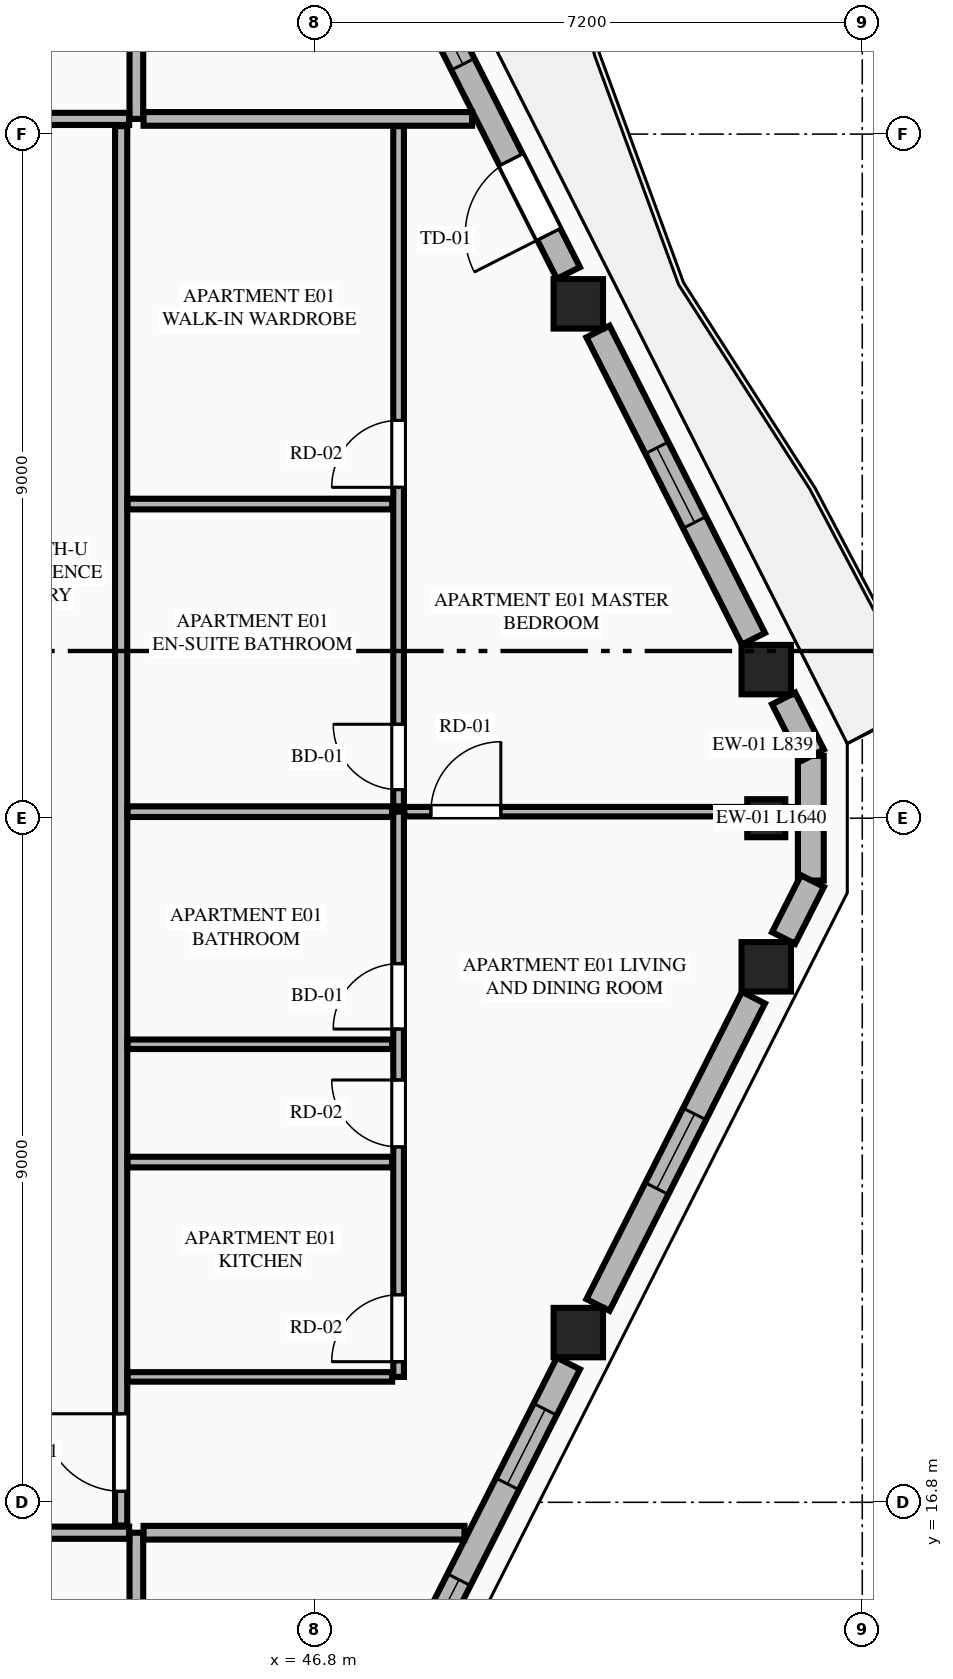
"""IFC4 building model, lengths in metres.
Left out: names, types, materials, properties, quantities, classifications, styles, units other than length and angle.
Written with IfcOpenShell. Run it as: python <this file> out.ifc"""

import sys

from ifc_helpers import new_model, si_unit, direction, frame, frame_2d, origin, origin_2d, place, context, subcontext, project, spatial, rectangle, extrude, element, fill, save


model = new_model("IFC4")
c1 = context("Model", 3, precision=1e-05, world=origin(), true_north=direction((0.0, 1.0)))
c2 = subcontext(c1, "Body", "Model", "MODEL_VIEW")
j1 = project(units=[si_unit("LENGTHUNIT", "METRE"), si_unit("PLANEANGLEUNIT", "RADIAN")], contexts=[c1])
p1 = place(None, origin())
s1 = spatial("IfcSite", under=j1, at=p1, CompositionType="ELEMENT")
p2 = place(p1, origin())
s2 = spatial("IfcBuilding", under=s1, at=p2, CompositionType="ELEMENT")
p3 = place(p2, frame((0.0, 0.0, 291.5)))
s3 = spatial("IfcBuildingStorey", under=s2, at=p3, CompositionType="ELEMENT", Elevation=291.5)
for number, where, z_axis, x_axis in (
    (1, (50.264, 19.033, 0.0), (0.0, 0.0, 1.0), (1.0, 0.0, 0.0)),
    (2, (52.737, 23.845, 0.0), (0.0, 0.0, 1.0), (1.0, 0.0, 0.0)),
    (3, (52.737, 27.755, 0.0), (0.0, 0.0, 1.0), (1.0, 0.0, 0.0)),
    (4, (50.264, 32.567, 0.0), (0.0, 0.0, 1.0), (1.0, 0.0, 0.0)),
):
    element("IfcColumn", number, at=place(p3, frame(where, z_axis=z_axis, x_axis=x_axis)), inside=s3, PredefinedType="COLUMN", context=c2, shape_type="SweptSolid", body=[
        extrude(rectangle(XDim=0.65, YDim=0.65, at=origin_2d()), origin(), (0.0, 0.0, 1.0), 4.0),
    ])
p4 = place(p3, frame((52.737, 25.8, 0.0), z_axis=(0.0, 0.0, 1.0), x_axis=(0.0, 1.0, 0.0)))
e5 = element("IfcColumn", 5, at=p4, inside=s3, PredefinedType="PILASTER", context=c2, shape_type="SweptSolid", body=[
    extrude(rectangle(XDim=0.5, YDim=0.35, at=origin_2d()), origin(), (0.0, 0.0, 1.0), 4.0),
])
p5 = place(p3, frame((53.323, 24.98, 0.0), z_axis=(0.0, 0.0, 1.0), x_axis=(0.0, 1.0, 0.0)))
e6 = element("IfcWall", 6, at=p5, inside=s3, PredefinedType="STANDARD", context=c2, shape_type="SweptSolid", body=[
    extrude(rectangle(XDim=1.64, YDim=0.34, at=frame_2d((0.82, 0.0))), origin(), (0.0, 0.0, 1.0), 3.8),
])
p6 = place(p3, frame((48.002, 14.413, 0.0), z_axis=(0.0, 0.0, 1.0), x_axis=(0.451468341582, 0.892287137949, 0.0)))
e7 = element("IfcWall", 7, at=p6, inside=s3, PredefinedType="STANDARD", context=c2, shape_type="SweptSolid", body=[
    extrude(rectangle(XDim=4.723, YDim=0.34, at=frame_2d((2.361, 0.0))), origin(), (0.0, 0.0, 1.0), 2.99),
])
p7 = place(p6, frame((0.434, 0.0, 0.75)))
e8 = element("IfcOpeningElement", 8, at=p7, cuts=e7, PredefinedType="OPENING", context=c2, shape_type="SweptSolid", body=[
    extrude(rectangle(XDim=1.1, YDim=2.0, at=frame_2d((0.55, 1.0))), frame((0.0, 0.18, 0.0), z_axis=(0.0, -1.0, 0.0), x_axis=(1.0, 0.0, 0.0)), (0.0, 0.0, 1.0), 0.36),
])
p8 = place(p6, frame((2.946, 0.0, 0.75)))
e9 = element("IfcOpeningElement", 9, at=p8, cuts=e7, PredefinedType="OPENING", context=c2, shape_type="SweptSolid", body=[
    extrude(rectangle(XDim=1.1, YDim=2.0, at=frame_2d((0.55, 1.0))), frame((0.0, 0.18, 0.0), z_axis=(0.0, -1.0, 0.0), x_axis=(1.0, 0.0, 0.0)), (0.0, 0.0, 1.0), 0.36),
])
p9 = place(p3, frame((50.523, 19.397, 0.0), z_axis=(0.0, 0.0, 1.0), x_axis=(0.45147697324, 0.892282770558, 0.0)))
e10 = element("IfcWall", 10, at=p9, inside=s3, PredefinedType="STANDARD", context=c2, shape_type="SweptSolid", body=[
    extrude(rectangle(XDim=4.53, YDim=0.34, at=frame_2d((2.265, 0.0))), origin(), (0.0, 0.0, 1.0), 2.99),
])
p10 = place(p9, frame((1.715, 0.0, 0.75)))
e11 = element("IfcOpeningElement", 11, at=p10, cuts=e10, PredefinedType="OPENING", context=c2, shape_type="SweptSolid", body=[
    extrude(rectangle(XDim=1.1, YDim=2.0, at=frame_2d((0.55, 1.0))), frame((0.0, 0.18, 0.0), z_axis=(0.0, -1.0, 0.0), x_axis=(1.0, 0.0, 0.0)), (0.0, 0.0, 1.0), 0.36),
])
p11 = place(p3, frame((52.965, 24.224, 0.0), z_axis=(0.0, 0.0, 1.0), x_axis=(0.4515140893, 0.892263989615, 0.0)))
e12 = element("IfcWall", 12, at=p11, inside=s3, PredefinedType="STANDARD", context=c2, shape_type="SweptSolid", body=[
    extrude(rectangle(XDim=0.839, YDim=0.34, at=frame_2d((0.419, 0.0))), origin(), (0.0, 0.0, 1.0), 3.8),
])
p12 = place(p3, frame((53.344, 26.627, 0.0), z_axis=(0.0, 0.0, 1.0), x_axis=(-0.45139691133, 0.892323275748, 0.0)))
e13 = element("IfcWall", 13, at=p12, inside=s3, PredefinedType="STANDARD", context=c2, shape_type="SweptSolid", body=[
    extrude(rectangle(XDim=0.839, YDim=0.34, at=frame_2d((0.42, 0.0))), origin(), (0.0, 0.0, 1.0), 3.8),
])
p13 = place(p3, frame((52.568, 28.161, 0.0), z_axis=(0.0, 0.0, 1.0), x_axis=(-0.45147697324, 0.892282770558, 0.0)))
e14 = element("IfcWall", 14, at=p13, inside=s3, PredefinedType="STANDARD", context=c2, shape_type="SweptSolid", body=[
    extrude(rectangle(XDim=4.53, YDim=0.34, at=frame_2d((2.265, 0.0))), origin(), (0.0, 0.0, 1.0), 2.99),
])
p14 = place(p13, frame((1.715, 0.0, 0.75)))
e15 = element("IfcOpeningElement", 15, at=p14, cuts=e14, PredefinedType="OPENING", context=c2, shape_type="SweptSolid", body=[
    extrude(rectangle(XDim=1.1, YDim=2.0, at=frame_2d((0.55, 1.0))), frame((0.0, 0.18, 0.0), z_axis=(0.0, -1.0, 0.0), x_axis=(1.0, 0.0, 0.0)), (0.0, 0.0, 1.0), 0.36),
])
p15 = place(p3, frame((50.134, 32.973, 0.0), z_axis=(0.0, 0.0, 1.0), x_axis=(-0.451447516904, 0.892297674255, 0.0)))
e16 = element("IfcWall", 16, at=p15, inside=s3, PredefinedType="STANDARD", context=c2, shape_type="SweptSolid", body=[
    extrude(rectangle(XDim=4.723, YDim=0.34, at=frame_2d((2.361, 0.0))), origin(), (0.0, 0.0, 1.0), 2.99),
])
p16 = place(p15, frame((0.57, 0.0, 0.0)))
e17 = element("IfcOpeningElement", 17, at=p16, cuts=e16, PredefinedType="OPENING", context=c2, shape_type="SweptSolid", body=[
    extrude(rectangle(XDim=1.1, YDim=2.25, at=frame_2d((0.55, 1.125))), frame((0.0, 0.18, 0.0), z_axis=(0.0, -1.0, 0.0), x_axis=(1.0, 0.0, 0.0)), (0.0, 0.0, 1.0), 0.36),
])
p17 = place(p15, frame((3.077, 0.0, 0.75)))
e18 = element("IfcOpeningElement", 18, at=p17, cuts=e16, PredefinedType="OPENING", context=c2, shape_type="SweptSolid", body=[
    extrude(rectangle(XDim=1.1, YDim=2.0, at=frame_2d((0.55, 1.0))), frame((0.0, 0.18, 0.0), z_axis=(0.0, -1.0, 0.0), x_axis=(1.0, 0.0, 0.0)), (0.0, 0.0, 1.0), 0.36),
])
p18 = place(p3, frame((44.45, 8.119, 0.0), z_axis=(0.0, 0.0, 1.0), x_axis=(0.0, 1.0, 0.0)))
e19 = element("IfcWall", 19, at=p18, inside=s3, PredefinedType="PARTITIONING", context=c2, shape_type="SweptSolid", body=[
    extrude(rectangle(XDim=8.281, YDim=0.18, at=frame_2d((4.141, 0.0))), origin(), (0.0, 0.0, 1.0), 3.8),
])
p19 = place(p3, frame((20.445, 16.4, 0.0), z_axis=(0.0, 0.0, 1.0), x_axis=(1.0, 0.0, 0.0)))
e20 = element("IfcWall", 20, at=p19, inside=s3, PredefinedType="PARTITIONING", context=c2, shape_type="SweptSolid", body=[
    extrude(rectangle(XDim=23.91, YDim=0.16, at=frame_2d((11.955, 0.0))), origin(), (0.0, 0.0, 1.0), 3.8),
])
p20 = place(p19, frame((0.705, 0.0, 0.0)))
e21 = element("IfcOpeningElement", 21, at=p20, cuts=e20, PredefinedType="OPENING", context=c2, shape_type="SweptSolid", body=[
    extrude(rectangle(XDim=1.35, YDim=2.35, at=frame_2d((0.675, 1.175))), frame((0.0, 0.09, 0.0), z_axis=(0.0, -1.0, 0.0), x_axis=(1.0, 0.0, 0.0)), (0.0, 0.0, 1.0), 0.18),
])
p21 = place(p3, frame((44.45, 35.0, 0.0), z_axis=(0.0, 0.0, 1.0), x_axis=(0.0, 1.0, 0.0)))
e22 = element("IfcWall", 22, at=p21, inside=s3, PredefinedType="PARTITIONING", context=c2, shape_type="SweptSolid", body=[
    extrude(rectangle(XDim=8.481, YDim=0.18, at=frame_2d((4.24, 0.0))), origin(), (0.0, 0.0, 1.0), 3.8),
])
p22 = place(p3, frame((20.445, 35.0, 0.0), z_axis=(0.0, 0.0, 1.0), x_axis=(1.0, 0.0, 0.0)))
e23 = element("IfcWall", 23, at=p22, inside=s3, PredefinedType="PARTITIONING", context=c2, shape_type="SweptSolid", body=[
    extrude(rectangle(XDim=23.91, YDim=0.16, at=frame_2d((11.955, 0.0))), origin(), (0.0, 0.0, 1.0), 3.8),
])
p23 = place(p22, frame((0.405, 0.0, 0.0)))
e24 = element("IfcOpeningElement", 24, at=p23, cuts=e23, PredefinedType="OPENING", context=c2, shape_type="SweptSolid", body=[
    extrude(rectangle(XDim=1.35, YDim=2.35, at=frame_2d((0.675, 1.175))), frame((0.0, 0.09, 0.0), z_axis=(0.0, -1.0, 0.0), x_axis=(1.0, 0.0, 0.0)), (0.0, 0.0, 1.0), 0.18),
])
p24 = place(p3, frame((44.545, 16.4, 0.0), z_axis=(0.0, 0.0, 1.0), x_axis=(1.0, 0.0, 0.0)))
e25 = element("IfcWall", 25, at=p24, inside=s3, PredefinedType="PARTITIONING", context=c2, shape_type="SweptSolid", body=[
    extrude(rectangle(XDim=4.221, YDim=0.18, at=frame_2d((2.111, 0.0))), origin(), (0.0, 0.0, 1.0), 3.8),
])
p25 = place(p3, frame((44.545, 35.0, 0.0), z_axis=(0.0, 0.0, 1.0), x_axis=(1.0, 0.0, 0.0)))
e26 = element("IfcWall", 26, at=p25, inside=s3, PredefinedType="PARTITIONING", context=c2, shape_type="SweptSolid", body=[
    extrude(rectangle(XDim=4.322, YDim=0.18, at=frame_2d((2.161, 0.0))), origin(), (0.0, 0.0, 1.0), 3.8),
])
p26 = place(p3, frame((44.25, 16.495, 0.0), z_axis=(0.0, 0.0, 1.0), x_axis=(0.0, 1.0, 0.0)))
e27 = element("IfcWall", 27, at=p26, inside=s3, PredefinedType="PARTITIONING", context=c2, shape_type="SweptSolid", body=[
    extrude(rectangle(XDim=18.41, YDim=0.16, at=frame_2d((9.205, 0.0))), origin(), (0.0, 0.0, 1.0), 3.487),
])
p27 = place(p26, frame((0.45, 0.0, 0.0)))
e28 = element("IfcOpeningElement", 28, at=p27, cuts=e27, PredefinedType="OPENING", context=c2, shape_type="SweptSolid", body=[
    extrude(rectangle(XDim=1.02, YDim=2.25, at=frame_2d((0.51, 1.125))), frame((0.0, 0.09, 0.0), z_axis=(0.0, -1.0, 0.0), x_axis=(1.0, 0.0, 0.0)), (0.0, 0.0, 1.0), 0.18),
])
p28 = place(p3, frame((44.335, 18.45, 0.0), z_axis=(0.0, 0.0, 1.0), x_axis=(1.0, 0.0, 0.0)))
e29 = element("IfcWall", 29, at=p28, inside=s3, PredefinedType="PARTITIONING", context=c2, shape_type="SweptSolid", body=[
    extrude(rectangle(XDim=3.48, YDim=0.125, at=frame_2d((1.74, 0.0))), origin(), (0.0, 0.0, 1.0), 3.8),
])
p29 = place(p3, frame((47.9, 18.45, 0.0), z_axis=(0.0, 0.0, 1.0), x_axis=(0.0, 1.0, 0.0)))
e30 = element("IfcWall", 30, at=p29, inside=s3, PredefinedType="PLUMBINGWALL", context=c2, shape_type="SweptSolid", body=[
    extrude(rectangle(XDim=7.436, YDim=0.14, at=frame_2d((3.718, 0.0))), origin(), (0.0, 0.0, 1.0), 3.8),
])
p30 = place(p29, frame((0.2, 0.0, 0.0)))
e31 = element("IfcOpeningElement", 31, at=p30, cuts=e30, PredefinedType="OPENING", context=c2, shape_type="SweptSolid", body=[
    extrude(rectangle(XDim=0.88, YDim=2.15, at=frame_2d((0.44, 1.075))), frame((0.0, 0.08, 0.0), z_axis=(0.0, -1.0, 0.0), x_axis=(1.0, 0.0, 0.0)), (0.0, 0.0, 1.0), 0.16),
])
p31 = place(p29, frame((3.026, 0.0, 0.0)))
e32 = element("IfcOpeningElement", 32, at=p31, cuts=e30, PredefinedType="OPENING", context=c2, shape_type="SweptSolid", body=[
    extrude(rectangle(XDim=0.88, YDim=2.15, at=frame_2d((0.44, 1.075))), frame((0.0, 0.08, 0.0), z_axis=(0.0, -1.0, 0.0), x_axis=(1.0, 0.0, 0.0)), (0.0, 0.0, 1.0), 0.16),
])
p32 = place(p29, frame((4.576, 0.0, 0.0)))
e33 = element("IfcOpeningElement", 33, at=p32, cuts=e30, PredefinedType="OPENING", context=c2, shape_type="SweptSolid", body=[
    extrude(rectangle(XDim=0.86, YDim=2.1, at=frame_2d((0.43, 1.05))), frame((0.0, 0.08, 0.0), z_axis=(0.0, -1.0, 0.0), x_axis=(1.0, 0.0, 0.0)), (0.0, 0.0, 1.0), 0.16),
])
p33 = place(p3, frame((47.9, 25.956, 0.0), z_axis=(0.0, 0.0, 1.0), x_axis=(0.0, 1.0, 0.0)))
e34 = element("IfcWall", 34, at=p33, inside=s3, PredefinedType="PLUMBINGWALL", context=c2, shape_type="SweptSolid", body=[
    extrude(rectangle(XDim=8.949, YDim=0.14, at=frame_2d((4.475, 0.0))), origin(), (0.0, 0.0, 1.0), 3.8),
])
p34 = place(p33, frame((0.22, 0.0, 0.0)))
e35 = element("IfcOpeningElement", 35, at=p34, cuts=e34, PredefinedType="OPENING", context=c2, shape_type="SweptSolid", body=[
    extrude(rectangle(XDim=0.86, YDim=2.1, at=frame_2d((0.43, 1.05))), frame((0.0, 0.08, 0.0), z_axis=(0.0, -1.0, 0.0), x_axis=(1.0, 0.0, 0.0)), (0.0, 0.0, 1.0), 0.16),
])
p35 = place(p33, frame((4.197, 0.0, 0.0)))
e36 = element("IfcOpeningElement", 36, at=p35, cuts=e34, PredefinedType="OPENING", context=c2, shape_type="SweptSolid", body=[
    extrude(rectangle(XDim=0.88, YDim=2.15, at=frame_2d((0.44, 1.075))), frame((0.0, 0.08, 0.0), z_axis=(0.0, -1.0, 0.0), x_axis=(1.0, 0.0, 0.0)), (0.0, 0.0, 1.0), 0.16),
])
p36 = place(p3, frame((44.335, 25.886, 0.0), z_axis=(0.0, 0.0, 1.0), x_axis=(1.0, 0.0, 0.0)))
e37 = element("IfcWall", 37, at=p36, inside=s3, PredefinedType="PLUMBINGWALL", context=c2, shape_type="SweptSolid", body=[
    extrude(rectangle(XDim=3.48, YDim=0.14, at=frame_2d((1.74, 0.0))), origin(), (0.0, 0.0, 1.0), 3.8),
])
p37 = place(p3, frame((47.975, 25.886, 0.0), z_axis=(0.0, 0.0, 1.0), x_axis=(1.0, 0.0, 0.0)))
e38 = element("IfcWall", 38, at=p37, inside=s3, PredefinedType="PARTITIONING", context=c2, shape_type="SweptSolid", body=[
    extrude(rectangle(XDim=5.165, YDim=0.125, at=frame_2d((2.583, 0.0))), origin(), (0.0, 0.0, 1.0), 3.8),
])
p38 = place(p37, frame((0.35, 0.0, 0.0)))
e39 = element("IfcOpeningElement", 39, at=p38, cuts=e38, PredefinedType="OPENING", context=c2, shape_type="SweptSolid", body=[
    extrude(rectangle(XDim=0.92, YDim=2.15, at=frame_2d((0.46, 1.075))), frame((0.0, 0.073, 0.0), z_axis=(0.0, -1.0, 0.0), x_axis=(1.0, 0.0, 0.0)), (0.0, 0.0, 1.0), 0.145),
])
p39 = place(p3, frame((44.335, 21.276, 0.0), z_axis=(0.0, 0.0, 1.0), x_axis=(1.0, 0.0, 0.0)))
e40 = element("IfcWall", 40, at=p39, inside=s3, PredefinedType="PLUMBINGWALL", context=c2, shape_type="SweptSolid", body=[
    extrude(rectangle(XDim=3.48, YDim=0.14, at=frame_2d((1.74, 0.0))), origin(), (0.0, 0.0, 1.0), 3.8),
])
p40 = place(p3, frame((44.335, 22.826, 0.0), z_axis=(0.0, 0.0, 1.0), x_axis=(1.0, 0.0, 0.0)))
e41 = element("IfcWall", 41, at=p40, inside=s3, PredefinedType="PARTITIONING", context=c2, shape_type="SweptSolid", body=[
    extrude(rectangle(XDim=3.48, YDim=0.125, at=frame_2d((1.74, 0.0))), origin(), (0.0, 0.0, 1.0), 3.8),
])
p41 = place(p3, frame((44.335, 29.933, 0.0), z_axis=(0.0, 0.0, 1.0), x_axis=(1.0, 0.0, 0.0)))
e42 = element("IfcWall", 42, at=p41, inside=s3, PredefinedType="PLUMBINGWALL", context=c2, shape_type="SweptSolid", body=[
    extrude(rectangle(XDim=3.48, YDim=0.14, at=frame_2d((1.74, 0.0))), origin(), (0.0, 0.0, 1.0), 3.8),
])
p42 = place(p7, origin())
e43 = element("IfcWindow", 43, at=p42, inside=s3, PartitioningType="SINGLE_PANEL", PredefinedType="WINDOW", context=c2, shape_type="SweptSolid", body=[
    extrude(rectangle(XDim=1.1, YDim=2.0, at=frame_2d((0.55, 1.0))), frame((0.0, 0.03, 0.0), z_axis=(0.0, -1.0, 0.0), x_axis=(1.0, 0.0, 0.0)), (0.0, 0.0, 1.0), 0.06),
])
fill(e8, e43)
p43 = place(p10, origin())
e44 = element("IfcWindow", 44, at=p43, inside=s3, PartitioningType="SINGLE_PANEL", PredefinedType="WINDOW", context=c2, shape_type="SweptSolid", body=[
    extrude(rectangle(XDim=1.1, YDim=2.0, at=frame_2d((0.55, 1.0))), frame((0.0, 0.03, 0.0), z_axis=(0.0, -1.0, 0.0), x_axis=(1.0, 0.0, 0.0)), (0.0, 0.0, 1.0), 0.06),
])
fill(e11, e44)
p44 = place(p14, origin())
e45 = element("IfcWindow", 45, at=p44, inside=s3, PartitioningType="SINGLE_PANEL", PredefinedType="WINDOW", context=c2, shape_type="SweptSolid", body=[
    extrude(rectangle(XDim=1.1, YDim=2.0, at=frame_2d((0.55, 1.0))), frame((0.0, 0.03, 0.0), z_axis=(0.0, -1.0, 0.0), x_axis=(1.0, 0.0, 0.0)), (0.0, 0.0, 1.0), 0.06),
])
fill(e15, e45)
p45 = place(p16, origin())
e46 = element("IfcDoor", 46, at=p45, inside=s3, OperationType="SINGLE_SWING_LEFT", PredefinedType="DOOR", context=c2, shape_type="SweptSolid", body=[
    extrude(rectangle(XDim=1.1, YDim=2.25, at=frame_2d((0.55, 1.125))), frame((0.0, 0.025, 0.0), z_axis=(0.0, -1.0, 0.0), x_axis=(1.0, 0.0, 0.0)), (0.0, 0.0, 1.0), 0.05),
])
fill(e17, e46)
p46 = place(p30, origin())
e47 = element("IfcDoor", 47, at=p46, inside=s3, OperationType="SINGLE_SWING_LEFT", PredefinedType="DOOR", context=c2, shape_type="SweptSolid", body=[
    extrude(rectangle(XDim=0.88, YDim=2.15, at=frame_2d((0.44, 1.075))), frame((0.0, 0.025, 0.0), z_axis=(0.0, -1.0, 0.0), x_axis=(1.0, 0.0, 0.0)), (0.0, 0.0, 1.0), 0.05),
])
fill(e31, e47)
p47 = place(p31, origin())
e48 = element("IfcDoor", 48, at=p47, inside=s3, OperationType="SINGLE_SWING_RIGHT", PredefinedType="DOOR", context=c2, shape_type="SweptSolid", body=[
    extrude(rectangle(XDim=0.88, YDim=2.15, at=frame_2d((0.44, 1.075))), frame((0.0, 0.025, 0.0), z_axis=(0.0, -1.0, 0.0), x_axis=(1.0, 0.0, 0.0)), (0.0, 0.0, 1.0), 0.05),
])
fill(e32, e48)
p48 = place(p32, origin())
e49 = element("IfcDoor", 49, at=p48, inside=s3, OperationType="SINGLE_SWING_LEFT", PredefinedType="DOOR", context=c2, shape_type="SweptSolid", body=[
    extrude(rectangle(XDim=0.86, YDim=2.1, at=frame_2d((0.43, 1.05))), frame((0.0, 0.025, 0.0), z_axis=(0.0, -1.0, 0.0), x_axis=(1.0, 0.0, 0.0)), (0.0, 0.0, 1.0), 0.05),
])
fill(e33, e49)
p49 = place(p34, origin())
e50 = element("IfcDoor", 50, at=p49, inside=s3, OperationType="SINGLE_SWING_RIGHT", PredefinedType="DOOR", context=c2, shape_type="SweptSolid", body=[
    extrude(rectangle(XDim=0.86, YDim=2.1, at=frame_2d((0.43, 1.05))), frame((0.0, 0.025, 0.0), z_axis=(0.0, -1.0, 0.0), x_axis=(1.0, 0.0, 0.0)), (0.0, 0.0, 1.0), 0.05),
])
fill(e35, e50)
p50 = place(p35, origin())
e51 = element("IfcDoor", 51, at=p50, inside=s3, OperationType="SINGLE_SWING_LEFT", PredefinedType="DOOR", context=c2, shape_type="SweptSolid", body=[
    extrude(rectangle(XDim=0.88, YDim=2.15, at=frame_2d((0.44, 1.075))), frame((0.0, 0.025, 0.0), z_axis=(0.0, -1.0, 0.0), x_axis=(1.0, 0.0, 0.0)), (0.0, 0.0, 1.0), 0.05),
])
fill(e36, e51)
p51 = place(p27, origin())
e52 = element("IfcDoor", 52, at=p51, inside=s3, OperationType="SINGLE_SWING_RIGHT", PredefinedType="DOOR", context=c2, shape_type="SweptSolid", body=[
    extrude(rectangle(XDim=1.02, YDim=2.25, at=frame_2d((0.51, 1.125))), frame((0.0, 0.025, 0.0), z_axis=(0.0, -1.0, 0.0), x_axis=(1.0, 0.0, 0.0)), (0.0, 0.0, 1.0), 0.05),
])
fill(e28, e52)
p52 = place(p38, origin())
e53 = element("IfcDoor", 53, at=p52, inside=s3, OperationType="SINGLE_SWING_RIGHT", PredefinedType="DOOR", context=c2, shape_type="SweptSolid", body=[
    extrude(rectangle(XDim=0.92, YDim=2.15, at=frame_2d((0.46, 1.075))), frame((0.0, 0.025, 0.0), z_axis=(0.0, -1.0, 0.0), x_axis=(1.0, 0.0, 0.0)), (0.0, 0.0, 1.0), 0.05),
])
fill(e39, e53)
p53 = place(p8, origin())
e54 = element("IfcWindow", 54, at=p53, inside=s3, PartitioningType="SINGLE_PANEL", PredefinedType="WINDOW", context=c2, shape_type="SweptSolid", body=[
    extrude(rectangle(XDim=1.1, YDim=2.0, at=frame_2d((0.55, 1.0))), frame((0.0, 0.03, 0.0), z_axis=(0.0, -1.0, 0.0), x_axis=(1.0, 0.0, 0.0)), (0.0, 0.0, 1.0), 0.06),
])
fill(e9, e54)
p54 = place(p17, origin())
e55 = element("IfcWindow", 55, at=p54, inside=s3, PartitioningType="SINGLE_PANEL", PredefinedType="WINDOW", context=c2, shape_type="SweptSolid", body=[
    extrude(rectangle(XDim=1.1, YDim=2.0, at=frame_2d((0.55, 1.0))), frame((0.0, 0.03, 0.0), z_axis=(0.0, -1.0, 0.0), x_axis=(1.0, 0.0, 0.0)), (0.0, 0.0, 1.0), 0.06),
])
fill(e18, e55)
save(model, sys.argv[1])
